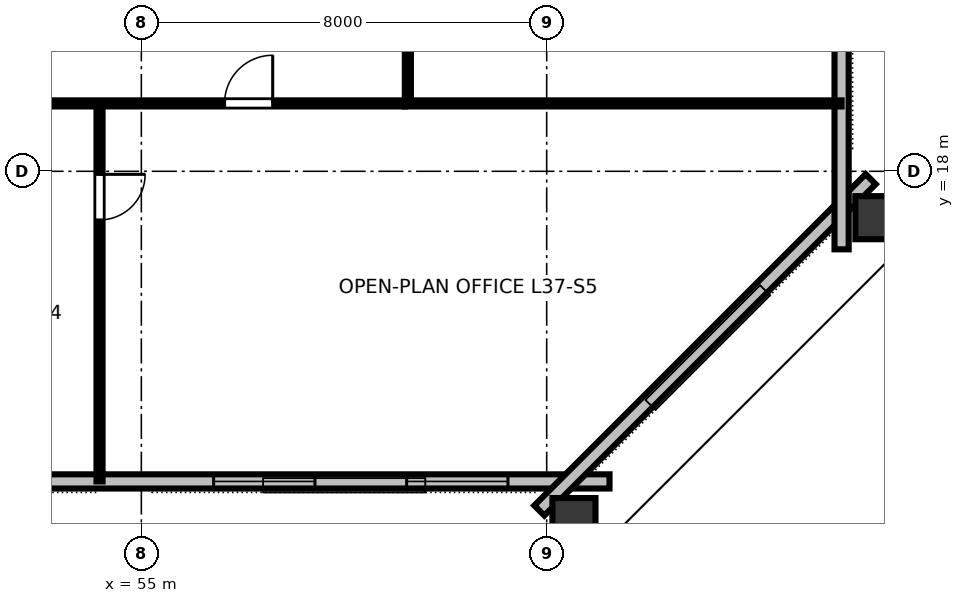
"""IFC4 building model, lengths in metres.
Left out: names, types, materials, properties, quantities, classifications, styles, units other than length and angle.
Written with IfcOpenShell. Run it as: python <this file> out.ifc"""

import sys

from ifc_helpers import new_model, si_unit, direction, frame, frame_2d, origin, origin_2d, place, context, subcontext, project, spatial, rectangle, hollow_rectangle, extrude, element, fill, save


model = new_model("IFC4")
c1 = context("Model", 3, precision=1e-05, world=origin(), true_north=direction((0.0, 1.0)))
c2 = subcontext(c1, "Body", "Model", "MODEL_VIEW")
j1 = project(units=[si_unit("LENGTHUNIT", "METRE"), si_unit("PLANEANGLEUNIT", "RADIAN")], contexts=[c1])
p1 = place(None, origin())
s1 = spatial("IfcSite", under=j1, at=p1, CompositionType="ELEMENT")
p2 = place(p1, origin())
s2 = spatial("IfcBuilding", under=s1, at=p2, CompositionType="ELEMENT")
p3 = place(p2, frame((0.0, 0.0, 142.0)))
s3 = spatial("IfcBuildingStorey", under=s2, at=p3, CompositionType="ELEMENT", Elevation=142.0)
for number, where, z_axis, x_axis in (
    (1, (63.538, 11.052, 0.0), (0.0, 0.0, 1.0), (1.0, 0.0, 0.0)),
    (2, (69.591, 17.085, 0.0), (0.0, 0.0, 1.0), (0.0, 1.0, 0.0)),
):
    element("IfcColumn", number, at=place(p3, frame(where, z_axis=z_axis, x_axis=x_axis)), inside=s3, PredefinedType="COLUMN", context=c2, shape_type="SweptSolid", body=[
        extrude(hollow_rectangle(XDim=0.85, YDim=1.0, WallThickness=0.05, at=origin_2d()), origin(), (0.0, 0.0, 1.0), 3.358),
    ])
p4 = place(p3, frame((27.76, 11.88, 0.0), z_axis=(0.0, 0.0, 1.0), x_axis=(1.0, 0.0, 0.0)))
e3 = element("IfcWall", 3, at=p4, inside=s3, PredefinedType="STANDARD", context=c2, shape_type="SweptSolid", body=[
    extrude(rectangle(XDim=36.48, YDim=0.28, at=frame_2d((18.24, 0.0))), origin(), (0.0, 0.0, 1.0), 3.36),
])
p5 = place(p4, frame((2.004, 0.0, 0.8)))
e4 = element("IfcOpeningElement", 4, at=p5, cuts=e3, PredefinedType="OPENING", context=c2, shape_type="SweptSolid", body=[
    extrude(rectangle(XDim=2.0, YDim=1.95, at=frame_2d((1.0, 0.975))), frame((0.0, 0.15, 0.0), z_axis=(0.0, -1.0, 0.0), x_axis=(1.0, 0.0, 0.0)), (0.0, 0.0, 1.0), 0.3),
])
p6 = place(p4, frame((5.813, 0.0, 0.8)))
e5 = element("IfcOpeningElement", 5, at=p6, cuts=e3, PredefinedType="OPENING", context=c2, shape_type="SweptSolid", body=[
    extrude(rectangle(XDim=2.0, YDim=1.95, at=frame_2d((1.0, 0.975))), frame((0.0, 0.15, 0.0), z_axis=(0.0, -1.0, 0.0), x_axis=(1.0, 0.0, 0.0)), (0.0, 0.0, 1.0), 0.3),
])
p7 = place(p4, frame((9.622, 0.0, 0.8)))
e6 = element("IfcOpeningElement", 6, at=p7, cuts=e3, PredefinedType="OPENING", context=c2, shape_type="SweptSolid", body=[
    extrude(rectangle(XDim=2.0, YDim=1.95, at=frame_2d((1.0, 0.975))), frame((0.0, 0.15, 0.0), z_axis=(0.0, -1.0, 0.0), x_axis=(1.0, 0.0, 0.0)), (0.0, 0.0, 1.0), 0.3),
])
p8 = place(p4, frame((13.431, 0.0, 0.8)))
e7 = element("IfcOpeningElement", 7, at=p8, cuts=e3, PredefinedType="OPENING", context=c2, shape_type="SweptSolid", body=[
    extrude(rectangle(XDim=2.0, YDim=1.95, at=frame_2d((1.0, 0.975))), frame((0.0, 0.15, 0.0), z_axis=(0.0, -1.0, 0.0), x_axis=(1.0, 0.0, 0.0)), (0.0, 0.0, 1.0), 0.3),
])
p9 = place(p4, frame((21.049, 0.0, 0.8)))
e8 = element("IfcOpeningElement", 8, at=p9, cuts=e3, PredefinedType="OPENING", context=c2, shape_type="SweptSolid", body=[
    extrude(rectangle(XDim=2.0, YDim=1.95, at=frame_2d((1.0, 0.975))), frame((0.0, 0.15, 0.0), z_axis=(0.0, -1.0, 0.0), x_axis=(1.0, 0.0, 0.0)), (0.0, 0.0, 1.0), 0.3),
])
p10 = place(p4, frame((28.667, 0.0, 0.8)))
e9 = element("IfcOpeningElement", 9, at=p10, cuts=e3, PredefinedType="OPENING", context=c2, shape_type="SweptSolid", body=[
    extrude(rectangle(XDim=2.0, YDim=1.95, at=frame_2d((1.0, 0.975))), frame((0.0, 0.15, 0.0), z_axis=(0.0, -1.0, 0.0), x_axis=(1.0, 0.0, 0.0)), (0.0, 0.0, 1.0), 0.3),
])
p11 = place(p4, frame((32.476, 0.0, 0.8)))
e10 = element("IfcOpeningElement", 10, at=p11, cuts=e3, PredefinedType="OPENING", context=c2, shape_type="SweptSolid", body=[
    extrude(rectangle(XDim=2.0, YDim=1.95, at=frame_2d((1.0, 0.975))), frame((0.0, 0.15, 0.0), z_axis=(0.0, -1.0, 0.0), x_axis=(1.0, 0.0, 0.0)), (0.0, 0.0, 1.0), 0.3),
])
p12 = place(p3, frame((62.854, 11.306, 0.0), z_axis=(0.0, 0.0, 1.0), x_axis=(0.707106781187, 0.707106781187, 0.0)))
e11 = element("IfcWall", 11, at=p12, inside=s3, PredefinedType="STANDARD", context=c2, shape_type="SweptSolid", body=[
    extrude(rectangle(XDim=9.248, YDim=0.28, at=frame_2d((4.624, 0.0))), origin(), (0.0, 0.0, 1.0), 3.36),
])
p13 = place(p3, frame((68.82, 16.46, 0.0), z_axis=(0.0, 0.0, 1.0), x_axis=(0.0, 1.0, 0.0)))
e12 = element("IfcWall", 12, at=p13, inside=s3, PredefinedType="STANDARD", context=c2, shape_type="SweptSolid", body=[
    extrude(rectangle(XDim=31.08, YDim=0.28, at=frame_2d((15.54, 0.0))), origin(), (0.0, 0.0, 1.0), 3.36),
])
p14 = place(p13, frame((11.86, 0.0, 0.0)))
e13 = element("IfcOpeningElement", 13, at=p14, cuts=e12, PredefinedType="OPENING", context=c2, shape_type="SweptSolid", body=[
    extrude(rectangle(XDim=1.4, YDim=2.15, at=frame_2d((0.7, 1.075))), frame((0.0, 0.15, 0.0), z_axis=(0.0, -1.0, 0.0), x_axis=(1.0, 0.0, 0.0)), (0.0, 0.0, 1.0), 0.3),
])
p15 = place(p13, frame((5.515, 0.0, 0.8)))
e14 = element("IfcOpeningElement", 14, at=p15, cuts=e12, PredefinedType="OPENING", context=c2, shape_type="SweptSolid", body=[
    extrude(rectangle(XDim=2.0, YDim=1.95, at=frame_2d((1.0, 0.975))), frame((0.0, 0.15, 0.0), z_axis=(0.0, -1.0, 0.0), x_axis=(1.0, 0.0, 0.0)), (0.0, 0.0, 1.0), 0.3),
])
p16 = place(p13, frame((9.125, 0.0, 0.8)))
e15 = element("IfcOpeningElement", 15, at=p16, cuts=e12, PredefinedType="OPENING", context=c2, shape_type="SweptSolid", body=[
    extrude(rectangle(XDim=2.0, YDim=1.95, at=frame_2d((1.0, 0.975))), frame((0.0, 0.15, 0.0), z_axis=(0.0, -1.0, 0.0), x_axis=(1.0, 0.0, 0.0)), (0.0, 0.0, 1.0), 0.3),
])
p17 = place(p13, frame((19.955, 0.0, 0.8)))
e16 = element("IfcOpeningElement", 16, at=p17, cuts=e12, PredefinedType="OPENING", context=c2, shape_type="SweptSolid", body=[
    extrude(rectangle(XDim=2.0, YDim=1.95, at=frame_2d((1.0, 0.975))), frame((0.0, 0.15, 0.0), z_axis=(0.0, -1.0, 0.0), x_axis=(1.0, 0.0, 0.0)), (0.0, 0.0, 1.0), 0.3),
])
p18 = place(p13, frame((23.565, 0.0, 0.8)))
e17 = element("IfcOpeningElement", 17, at=p18, cuts=e12, PredefinedType="OPENING", context=c2, shape_type="SweptSolid", body=[
    extrude(rectangle(XDim=2.0, YDim=1.95, at=frame_2d((1.0, 0.975))), frame((0.0, 0.15, 0.0), z_axis=(0.0, -1.0, 0.0), x_axis=(1.0, 0.0, 0.0)), (0.0, 0.0, 1.0), 0.3),
])
p19 = place(p3, frame((54.175, 19.34, 0.0), z_axis=(0.0, 0.0, 1.0), x_axis=(0.0, -1.0, 0.0)))
e18 = element("IfcWall", 18, at=p19, inside=s3, PredefinedType="PARTITIONING", context=c2, shape_type="SweptSolid", body=[
    extrude(rectangle(XDim=7.46, YDim=0.12, at=frame_2d((3.73, 0.0))), origin(), (0.0, 0.0, 1.0), 2.64),
])
p20 = place(p19, frame((1.4, 0.0, 0.0)))
e19 = element("IfcOpeningElement", 19, at=p20, cuts=e18, PredefinedType="OPENING", context=c2, shape_type="SweptSolid", body=[
    extrude(rectangle(XDim=0.9, YDim=2.15, at=frame_2d((0.45, 1.075))), frame((0.0, 0.07, 0.0), z_axis=(0.0, -1.0, 0.0), x_axis=(1.0, 0.0, 0.0)), (0.0, 0.0, 1.0), 0.14),
])
p21 = place(p3, frame((31.8, 19.34, 0.0), z_axis=(0.0, 0.0, 1.0), x_axis=(1.0, 0.0, 0.0)))
e20 = element("IfcWall", 20, at=p21, inside=s3, PredefinedType="PARTITIONING", context=c2, shape_type="SweptSolid", body=[
    extrude(rectangle(XDim=28.4, YDim=0.12, at=frame_2d((14.2, 0.0))), origin(), (0.0, 0.0, 1.0), 2.64),
])
p22 = place(p21, frame((3.771, 0.0, 0.0)))
e21 = element("IfcOpeningElement", 21, at=p22, cuts=e20, PredefinedType="OPENING", context=c2, shape_type="SweptSolid", body=[
    extrude(rectangle(XDim=0.95, YDim=2.15, at=frame_2d((0.475, 1.075))), frame((0.0, 0.07, 0.0), z_axis=(0.0, -1.0, 0.0), x_axis=(1.0, 0.0, 0.0)), (0.0, 0.0, 1.0), 0.14),
])
p23 = place(p21, frame((10.068, 0.0, 0.0)))
e22 = element("IfcOpeningElement", 22, at=p23, cuts=e20, PredefinedType="OPENING", context=c2, shape_type="SweptSolid", body=[
    extrude(rectangle(XDim=0.95, YDim=2.15, at=frame_2d((0.475, 1.075))), frame((0.0, 0.07, 0.0), z_axis=(0.0, -1.0, 0.0), x_axis=(1.0, 0.0, 0.0)), (0.0, 0.0, 1.0), 0.14),
])
p24 = place(p21, frame((13.828, 0.0, 0.0)))
e23 = element("IfcOpeningElement", 23, at=p24, cuts=e20, PredefinedType="OPENING", context=c2, shape_type="SweptSolid", body=[
    extrude(rectangle(XDim=0.95, YDim=2.15, at=frame_2d((0.475, 1.075))), frame((0.0, 0.07, 0.0), z_axis=(0.0, -1.0, 0.0), x_axis=(1.0, 0.0, 0.0)), (0.0, 0.0, 1.0), 0.14),
])
p25 = place(p21, frame((18.648, 0.0, 0.0)))
e24 = element("IfcOpeningElement", 24, at=p25, cuts=e20, PredefinedType="OPENING", context=c2, shape_type="SweptSolid", body=[
    extrude(rectangle(XDim=0.95, YDim=2.15, at=frame_2d((0.475, 1.075))), frame((0.0, 0.07, 0.0), z_axis=(0.0, -1.0, 0.0), x_axis=(1.0, 0.0, 0.0)), (0.0, 0.0, 1.0), 0.14),
])
p26 = place(p21, frame((24.842, 0.0, 0.0)))
e25 = element("IfcOpeningElement", 25, at=p26, cuts=e20, PredefinedType="OPENING", context=c2, shape_type="SweptSolid", body=[
    extrude(rectangle(XDim=0.95, YDim=2.15, at=frame_2d((0.475, 1.075))), frame((0.0, 0.07, 0.0), z_axis=(0.0, -1.0, 0.0), x_axis=(1.0, 0.0, 0.0)), (0.0, 0.0, 1.0), 0.14),
])
p27 = place(p3, frame((60.26, 19.4, 0.0), z_axis=(0.0, 0.0, 1.0), x_axis=(0.0, 1.0, 0.0)))
e26 = element("IfcWall", 26, at=p27, inside=s3, PredefinedType="PARTITIONING", context=c2, shape_type="SweptSolid", body=[
    extrude(rectangle(XDim=11.58, YDim=0.12, at=frame_2d((5.79, 0.0))), origin(), (0.0, 0.0, 1.0), 2.64),
])
p28 = place(p27, frame((5.415, 0.0, 0.0)))
e27 = element("IfcOpeningElement", 27, at=p28, cuts=e26, PredefinedType="OPENING", context=c2, shape_type="SweptSolid", body=[
    extrude(rectangle(XDim=0.95, YDim=2.15, at=frame_2d((0.475, 1.075))), frame((0.0, 0.07, 0.0), z_axis=(0.0, -1.0, 0.0), x_axis=(1.0, 0.0, 0.0)), (0.0, 0.0, 1.0), 0.14),
])
p29 = place(p3, frame((60.2, 19.34, 0.0), z_axis=(0.0, 0.0, 1.0), x_axis=(1.0, 0.0, 0.0)))
e28 = element("IfcWall", 28, at=p29, inside=s3, PredefinedType="PARTITIONING", context=c2, shape_type="SweptSolid", body=[
    extrude(rectangle(XDim=8.62, YDim=0.12, at=frame_2d((4.31, 0.0))), origin(), (0.0, 0.0, 1.0), 2.64),
])
p30 = place(p10, origin())
e29 = element("IfcWindow", 29, at=p30, inside=s3, PartitioningType="SINGLE_PANEL", PredefinedType="WINDOW", context=c2, shape_type="SweptSolid", body=[
    extrude(rectangle(XDim=2.0, YDim=1.95, at=frame_2d((1.0, 0.975))), frame((0.0, 0.03, 0.0), z_axis=(0.0, -1.0, 0.0), x_axis=(1.0, 0.0, 0.0)), (0.0, 0.0, 1.0), 0.06),
])
fill(e9, e29)
p31 = place(p11, origin())
e30 = element("IfcWindow", 30, at=p31, inside=s3, PartitioningType="SINGLE_PANEL", PredefinedType="WINDOW", context=c2, shape_type="SweptSolid", body=[
    extrude(rectangle(XDim=2.0, YDim=1.95, at=frame_2d((1.0, 0.975))), frame((0.0, 0.03, 0.0), z_axis=(0.0, -1.0, 0.0), x_axis=(1.0, 0.0, 0.0)), (0.0, 0.0, 1.0), 0.06),
])
fill(e10, e30)
p32 = place(p20, origin())
e31 = element("IfcDoor", 31, at=p32, inside=s3, OperationType="SINGLE_SWING_LEFT", PredefinedType="DOOR", context=c2, shape_type="SweptSolid", body=[
    extrude(rectangle(XDim=0.9, YDim=2.15, at=frame_2d((0.45, 1.075))), frame((0.0, 0.025, 0.0), z_axis=(0.0, -1.0, 0.0), x_axis=(1.0, 0.0, 0.0)), (0.0, 0.0, 1.0), 0.05),
])
fill(e19, e31)
p33 = place(p26, origin())
e32 = element("IfcDoor", 32, at=p33, inside=s3, OperationType="SINGLE_SWING_RIGHT", PredefinedType="DOOR", context=c2, shape_type="SweptSolid", body=[
    extrude(rectangle(XDim=0.95, YDim=2.15, at=frame_2d((0.475, 1.075))), frame((0.0, 0.025, 0.0), z_axis=(0.0, -1.0, 0.0), x_axis=(1.0, 0.0, 0.0)), (0.0, 0.0, 1.0), 0.05),
])
fill(e25, e32)
save(model, sys.argv[1])
